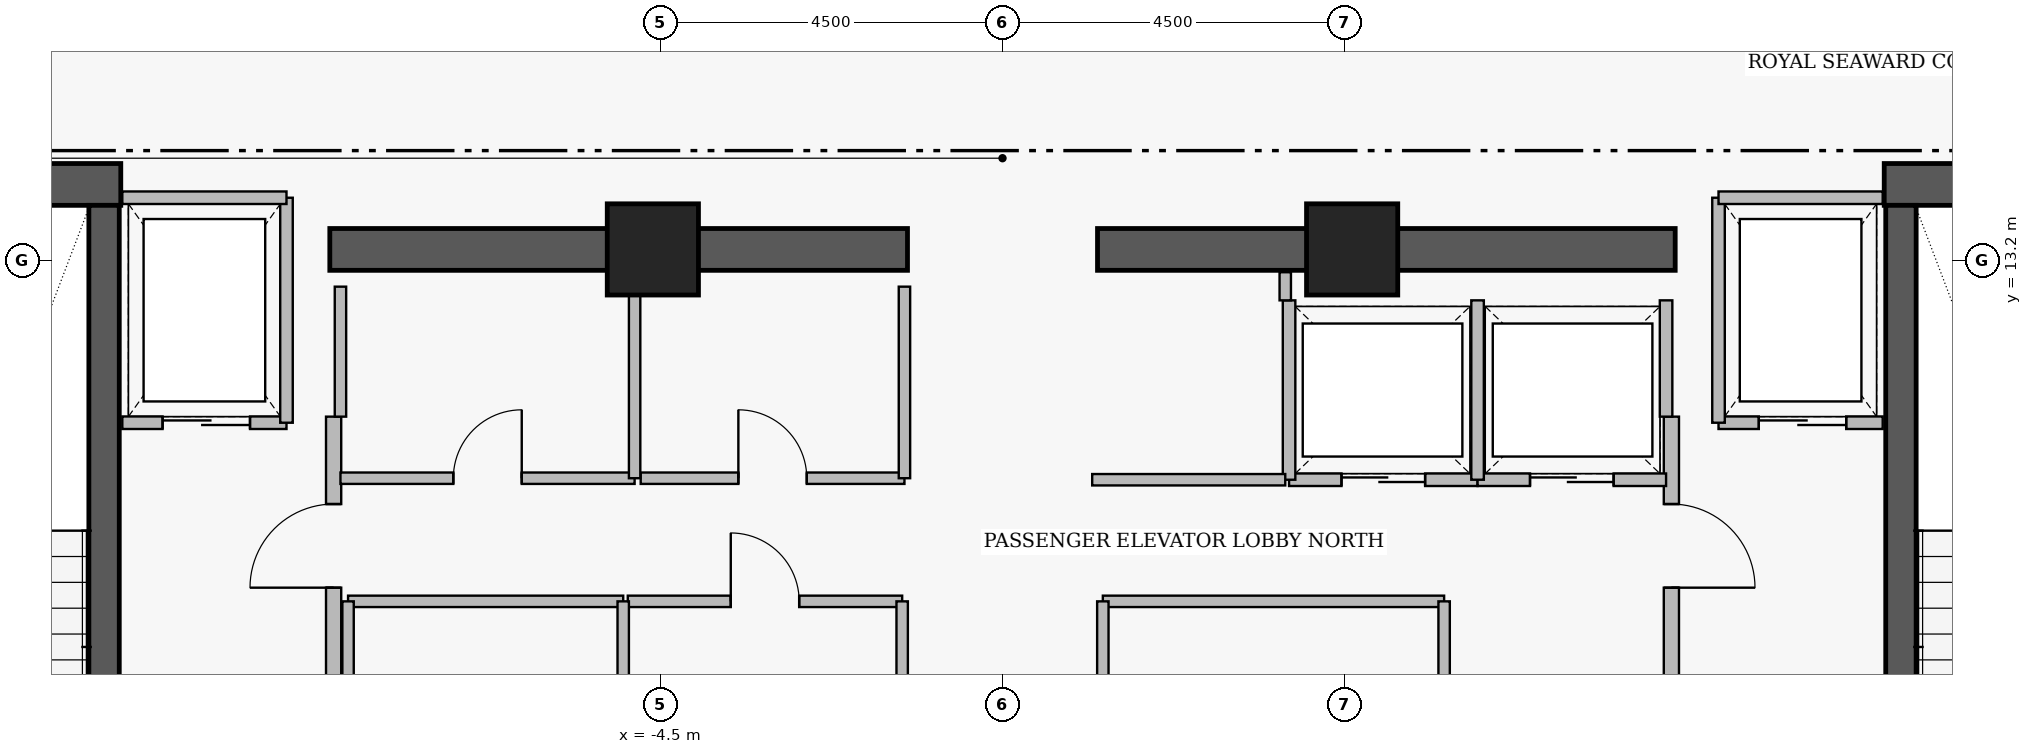
"""IFC4 building model, lengths in metres.
Left out: names, types, materials, properties, quantities, classifications, styles, units other than length and angle.
Written with IfcOpenShell. Run it as: python <this file> out.ifc"""

import sys

from ifc_helpers import new_model, si_unit, direction, frame, frame_2d, origin, origin_2d, place, context, subcontext, project, spatial, rectangle, extrude, element, fill, save


model = new_model("IFC4")
c1 = context("Model", 3, precision=1e-05, world=origin(), true_north=direction((0.0, 1.0)))
c2 = subcontext(c1, "Body", "Model", "MODEL_VIEW")
j1 = project(units=[si_unit("LENGTHUNIT", "METRE"), si_unit("PLANEANGLEUNIT", "RADIAN")], contexts=[c1])
p1 = place(None, origin())
s1 = spatial("IfcSite", under=j1, at=p1, CompositionType="ELEMENT")
p2 = place(p1, origin())
s2 = spatial("IfcBuilding", under=s1, at=p2, CompositionType="ELEMENT")
p3 = place(p2, frame((0.0, 0.0, 280.35)))
s3 = spatial("IfcBuildingStorey", under=s2, at=p3, CompositionType="ELEMENT", Elevation=280.35)
for number, where, z_axis, x_axis in (
    (1, (-15.96, 14.205, 0.0), (0.0, 0.0, 1.0), (1.0, 0.0, 0.0)),
    (2, (11.6, 14.205, 0.0), (0.0, 0.0, 1.0), (1.0, 0.0, 0.0)),
):
    element("IfcWall", number, at=place(p3, frame(where, z_axis=z_axis, x_axis=x_axis)), inside=s3, PredefinedType="SHEAR", context=c2, shape_type="SweptSolid", body=[
        extrude(rectangle(XDim=4.36, YDim=0.55, at=frame_2d((2.18, 0.0))), origin(), (0.0, 0.0, 1.0), 3.51),
    ])
for number, where, z_axis, x_axis in (
    (3, (-8.85, 13.35, 0.0), (0.0, 0.0, 1.0), (1.0, 0.0, 0.0)),
    (4, (1.25, 13.35, 0.0), (0.0, 0.0, 1.0), (1.0, 0.0, 0.0)),
):
    element("IfcWall", number, at=place(p3, frame(where, z_axis=z_axis, x_axis=x_axis)), inside=s3, PredefinedType="SHEAR", context=c2, shape_type="SweptSolid", body=[
        extrude(rectangle(XDim=7.6, YDim=0.55, at=frame_2d((3.8, 0.0))), origin(), (0.0, 0.0, 1.0), 3.48),
    ])
p4 = place(p3, frame((-11.82, 4.97, 0.0), z_axis=(0.0, 0.0, 1.0), x_axis=(0.0, 1.0, 0.0)))
e5 = element("IfcWall", 5, at=p4, inside=s3, PredefinedType="SHEAR", context=c2, shape_type="SweptSolid", body=[
    extrude(rectangle(XDim=8.96, YDim=0.4, at=frame_2d((4.48, 0.0))), origin(), (0.0, 0.0, 1.0), 3.51),
])
p5 = place(p4, frame((0.31, 0.0, 0.0)))
e6 = element("IfcOpeningElement", 6, at=p5, cuts=e5, PredefinedType="OPENING", context=c2, shape_type="SweptSolid", body=[
    extrude(rectangle(XDim=1.12, YDim=2.22, at=frame_2d((0.56, 1.11))), frame((0.0, 0.21, 0.0), z_axis=(0.0, -1.0, 0.0), x_axis=(1.0, 0.0, 0.0)), (0.0, 0.0, 1.0), 0.42),
])
p6 = place(p3, frame((11.82, 13.93, 0.0), z_axis=(0.0, 0.0, 1.0), x_axis=(0.0, -1.0, 0.0)))
e7 = element("IfcWall", 7, at=p6, inside=s3, PredefinedType="SHEAR", context=c2, shape_type="SweptSolid", body=[
    extrude(rectangle(XDim=8.96, YDim=0.4, at=frame_2d((4.48, 0.0))), origin(), (0.0, 0.0, 1.0), 3.51),
])
p7 = place(p6, frame((7.53, 0.0, 0.0)))
e8 = element("IfcOpeningElement", 8, at=p7, cuts=e7, PredefinedType="OPENING", context=c2, shape_type="SweptSolid", body=[
    extrude(rectangle(XDim=1.12, YDim=2.22, at=frame_2d((0.56, 1.11))), frame((0.0, 0.21, 0.0), z_axis=(0.0, -1.0, 0.0), x_axis=(1.0, 0.0, 0.0)), (0.0, 0.0, 1.0), 0.42),
])
for number, where, z_axis, x_axis in (
    (9, (-4.6, 13.35, 0.0), (0.0, 0.0, 1.0), (1.0, 0.0, 0.0)),
    (10, (4.6, 13.35, 0.0), (0.0, 0.0, 1.0), (1.0, 0.0, 0.0)),
):
    element("IfcColumn", number, at=place(p3, frame(where, z_axis=z_axis, x_axis=x_axis)), inside=s3, PredefinedType="COLUMN", context=c2, shape_type="SweptSolid", body=[
        extrude(rectangle(XDim=1.2, YDim=1.2, at=origin_2d()), origin(), (0.0, 0.0, 1.0), 3.7),
    ])
p8 = place(p3, frame((-8.8, 5.05, 0.0), z_axis=(0.0, 0.0, 1.0), x_axis=(0.0, 1.0, 0.0)))
e11 = element("IfcWall", 11, at=p8, inside=s3, PredefinedType="PARTITIONING", context=c2, shape_type="SweptSolid", body=[
    extrude(rectangle(XDim=6.1, YDim=0.2, at=frame_2d((3.05, 0.0))), origin(), (0.0, 0.0, 1.0), 3.48),
])
p9 = place(p8, frame((0.25, 0.0, 0.0)))
e12 = element("IfcOpeningElement", 12, at=p9, cuts=e11, PredefinedType="OPENING", context=c2, shape_type="SweptSolid", body=[
    extrude(rectangle(XDim=1.1, YDim=2.2, at=frame_2d((0.55, 1.1))), frame((0.0, 0.11, 0.0), z_axis=(0.0, -1.0, 0.0), x_axis=(1.0, 0.0, 0.0)), (0.0, 0.0, 1.0), 0.22),
])
p10 = place(p8, frame((3.85, 0.0, 0.0)))
e13 = element("IfcOpeningElement", 13, at=p10, cuts=e11, PredefinedType="OPENING", context=c2, shape_type="SweptSolid", body=[
    extrude(rectangle(XDim=1.1, YDim=2.2, at=frame_2d((0.55, 1.1))), frame((0.0, 0.11, 0.0), z_axis=(0.0, -1.0, 0.0), x_axis=(1.0, 0.0, 0.0)), (0.0, 0.0, 1.0), 0.22),
])
p11 = place(p3, frame((8.8, 11.15, 0.0), z_axis=(0.0, 0.0, 1.0), x_axis=(0.0, -1.0, 0.0)))
e14 = element("IfcWall", 14, at=p11, inside=s3, PredefinedType="PARTITIONING", context=c2, shape_type="SweptSolid", body=[
    extrude(rectangle(XDim=6.1, YDim=0.2, at=frame_2d((3.05, 0.0))), origin(), (0.0, 0.0, 1.0), 3.48),
])
p12 = place(p11, frame((1.15, 0.0, 0.0)))
e15 = element("IfcOpeningElement", 15, at=p12, cuts=e14, PredefinedType="OPENING", context=c2, shape_type="SweptSolid", body=[
    extrude(rectangle(XDim=1.1, YDim=2.2, at=frame_2d((0.55, 1.1))), frame((0.0, 0.11, 0.0), z_axis=(0.0, -1.0, 0.0), x_axis=(1.0, 0.0, 0.0)), (0.0, 0.0, 1.0), 0.22),
])
p13 = place(p11, frame((4.75, 0.0, 0.0)))
e16 = element("IfcOpeningElement", 16, at=p13, cuts=e14, PredefinedType="OPENING", context=c2, shape_type="SweptSolid", body=[
    extrude(rectangle(XDim=1.1, YDim=2.2, at=frame_2d((0.55, 1.1))), frame((0.0, 0.11, 0.0), z_axis=(0.0, -1.0, 0.0), x_axis=(1.0, 0.0, 0.0)), (0.0, 0.0, 1.0), 0.22),
])
p14 = place(p3, frame((-11.58, 11.07, 0.0), z_axis=(0.0, 0.0, 1.0), x_axis=(1.0, 0.0, 0.0)))
e17 = element("IfcWall", 17, at=p14, inside=s3, PredefinedType="PARTITIONING", context=c2, shape_type="SweptSolid", body=[
    extrude(rectangle(XDim=2.16, YDim=0.165, at=frame_2d((1.08, 0.0))), origin(), (0.0, 0.0, 1.0), 3.48),
])
p15 = place(p14, frame((0.53, 0.0, 0.0)))
e18 = element("IfcOpeningElement", 18, at=p15, cuts=e17, PredefinedType="OPENING", context=c2, shape_type="SweptSolid", body=[
    extrude(rectangle(XDim=1.15, YDim=2.25, at=frame_2d((0.575, 1.125))), frame((0.0, 0.093, 0.0), z_axis=(0.0, -1.0, 0.0), x_axis=(1.0, 0.0, 0.0)), (0.0, 0.0, 1.0), 0.185),
])
p16 = place(p3, frame((9.42, 11.07, 0.0), z_axis=(0.0, 0.0, 1.0), x_axis=(1.0, 0.0, 0.0)))
e19 = element("IfcWall", 19, at=p16, inside=s3, PredefinedType="PARTITIONING", context=c2, shape_type="SweptSolid", body=[
    extrude(rectangle(XDim=2.16, YDim=0.165, at=frame_2d((1.08, 0.0))), origin(), (0.0, 0.0, 1.0), 3.48),
])
p17 = place(p16, frame((0.53, 0.0, 0.0)))
e20 = element("IfcOpeningElement", 20, at=p17, cuts=e19, PredefinedType="OPENING", context=c2, shape_type="SweptSolid", body=[
    extrude(rectangle(XDim=1.15, YDim=2.25, at=frame_2d((0.575, 1.125))), frame((0.0, 0.093, 0.0), z_axis=(0.0, -1.0, 0.0), x_axis=(1.0, 0.0, 0.0)), (0.0, 0.0, 1.0), 0.185),
])
p18 = place(p3, frame((3.77, 10.32, 0.0), z_axis=(0.0, 0.0, 1.0), x_axis=(1.0, 0.0, 0.0)))
e21 = element("IfcWall", 21, at=p18, inside=s3, PredefinedType="PARTITIONING", context=c2, shape_type="SweptSolid", body=[
    extrude(rectangle(XDim=2.48, YDim=0.165, at=frame_2d((1.24, 0.0))), origin(), (0.0, 0.0, 1.0), 3.48),
])
p19 = place(p18, frame((0.69, 0.0, 0.0)))
e22 = element("IfcOpeningElement", 22, at=p19, cuts=e21, PredefinedType="OPENING", context=c2, shape_type="SweptSolid", body=[
    extrude(rectangle(XDim=1.1, YDim=2.25, at=frame_2d((0.55, 1.125))), frame((0.0, 0.093, 0.0), z_axis=(0.0, -1.0, 0.0), x_axis=(1.0, 0.0, 0.0)), (0.0, 0.0, 1.0), 0.185),
])
p20 = place(p3, frame((6.25, 10.32, 0.0), z_axis=(0.0, 0.0, 1.0), x_axis=(1.0, 0.0, 0.0)))
e23 = element("IfcWall", 23, at=p20, inside=s3, PredefinedType="PARTITIONING", context=c2, shape_type="SweptSolid", body=[
    extrude(rectangle(XDim=2.48, YDim=0.165, at=frame_2d((1.24, 0.0))), origin(), (0.0, 0.0, 1.0), 3.48),
])
p21 = place(p20, frame((0.69, 0.0, 0.0)))
e24 = element("IfcOpeningElement", 24, at=p21, cuts=e23, PredefinedType="OPENING", context=c2, shape_type="SweptSolid", body=[
    extrude(rectangle(XDim=1.1, YDim=2.25, at=frame_2d((0.55, 1.125))), frame((0.0, 0.093, 0.0), z_axis=(0.0, -1.0, 0.0), x_axis=(1.0, 0.0, 0.0)), (0.0, 0.0, 1.0), 0.185),
])
p22 = place(p3, frame((-8.71, 10.34, 0.0), z_axis=(0.0, 0.0, 1.0), x_axis=(1.0, 0.0, 0.0)))
e25 = element("IfcWall", 25, at=p22, inside=s3, PredefinedType="PARTITIONING", context=c2, shape_type="SweptSolid", body=[
    extrude(rectangle(XDim=3.87, YDim=0.15, at=frame_2d((1.935, 0.0))), origin(), (0.0, 0.0, 1.0), 3.48),
])
p23 = place(p22, frame((1.485, 0.0, 0.0)))
e26 = element("IfcOpeningElement", 26, at=p23, cuts=e25, PredefinedType="OPENING", context=c2, shape_type="SweptSolid", body=[
    extrude(rectangle(XDim=0.9, YDim=2.15, at=frame_2d((0.45, 1.075))), frame((0.0, 0.085, 0.0), z_axis=(0.0, -1.0, 0.0), x_axis=(1.0, 0.0, 0.0)), (0.0, 0.0, 1.0), 0.17),
])
p24 = place(p3, frame((-4.76, 10.34, 0.0), z_axis=(0.0, 0.0, 1.0), x_axis=(1.0, 0.0, 0.0)))
e27 = element("IfcWall", 27, at=p24, inside=s3, PredefinedType="PARTITIONING", context=c2, shape_type="SweptSolid", body=[
    extrude(rectangle(XDim=3.47, YDim=0.15, at=frame_2d((1.735, 0.0))), origin(), (0.0, 0.0, 1.0), 3.48),
])
p25 = place(p24, frame((1.285, 0.0, 0.0)))
e28 = element("IfcOpeningElement", 28, at=p25, cuts=e27, PredefinedType="OPENING", context=c2, shape_type="SweptSolid", body=[
    extrude(rectangle(XDim=0.9, YDim=2.15, at=frame_2d((0.45, 1.075))), frame((0.0, 0.085, 0.0), z_axis=(0.0, -1.0, 0.0), x_axis=(1.0, 0.0, 0.0)), (0.0, 0.0, 1.0), 0.17),
])
p26 = place(p3, frame((-4.93, 8.72, 0.0), z_axis=(0.0, 0.0, 1.0), x_axis=(1.0, 0.0, 0.0)))
e29 = element("IfcWall", 29, at=p26, inside=s3, PredefinedType="PARTITIONING", context=c2, shape_type="SweptSolid", body=[
    extrude(rectangle(XDim=3.61, YDim=0.15, at=frame_2d((1.805, 0.0))), origin(), (0.0, 0.0, 1.0), 3.48),
])
p27 = place(p26, frame((1.355, 0.0, 0.0)))
e30 = element("IfcOpeningElement", 30, at=p27, cuts=e29, PredefinedType="OPENING", context=c2, shape_type="SweptSolid", body=[
    extrude(rectangle(XDim=0.9, YDim=2.15, at=frame_2d((0.45, 1.075))), frame((0.0, 0.085, 0.0), z_axis=(0.0, -1.0, 0.0), x_axis=(1.0, 0.0, 0.0)), (0.0, 0.0, 1.0), 0.17),
])
p28 = place(p3, frame((-9.42, 11.07, 0.0), z_axis=(0.0, 0.0, 1.0), x_axis=(0.0, 1.0, 0.0)))
e31 = element("IfcWall", 31, at=p28, inside=s3, PredefinedType="PARTITIONING", context=c2, shape_type="SweptSolid", body=[
    extrude(rectangle(XDim=2.96, YDim=0.165, at=frame_2d((1.48, 0.0))), origin(), (0.0, 0.0, 1.0), 3.48),
])
p29 = place(p3, frame((-11.58, 14.03, 0.0), z_axis=(0.0, 0.0, 1.0), x_axis=(1.0, 0.0, 0.0)))
e32 = element("IfcWall", 32, at=p29, inside=s3, PredefinedType="PARTITIONING", context=c2, shape_type="SweptSolid", body=[
    extrude(rectangle(XDim=2.16, YDim=0.165, at=frame_2d((1.08, 0.0))), origin(), (0.0, 0.0, 1.0), 3.48),
])
p30 = place(p3, frame((9.42, 11.07, 0.0), z_axis=(0.0, 0.0, 1.0), x_axis=(0.0, 1.0, 0.0)))
e33 = element("IfcWall", 33, at=p30, inside=s3, PredefinedType="PARTITIONING", context=c2, shape_type="SweptSolid", body=[
    extrude(rectangle(XDim=2.96, YDim=0.165, at=frame_2d((1.48, 0.0))), origin(), (0.0, 0.0, 1.0), 3.48),
])
p31 = place(p3, frame((9.42, 14.03, 0.0), z_axis=(0.0, 0.0, 1.0), x_axis=(1.0, 0.0, 0.0)))
e34 = element("IfcWall", 34, at=p31, inside=s3, PredefinedType="PARTITIONING", context=c2, shape_type="SweptSolid", body=[
    extrude(rectangle(XDim=2.16, YDim=0.165, at=frame_2d((1.08, 0.0))), origin(), (0.0, 0.0, 1.0), 3.48),
])
for number, where, z_axis, x_axis in (
    (35, (3.77, 10.32, 0.0), (0.0, 0.0, 1.0), (0.0, 1.0, 0.0)),
    (36, (6.25, 10.32, 0.0), (0.0, 0.0, 1.0), (0.0, 1.0, 0.0)),
):
    element("IfcWall", number, at=place(p3, frame(where, z_axis=z_axis, x_axis=x_axis)), inside=s3, PredefinedType="PARTITIONING", context=c2, shape_type="SweptSolid", body=[
        extrude(rectangle(XDim=2.36, YDim=0.165, at=frame_2d((1.18, 0.0))), origin(), (0.0, 0.0, 1.0), 3.48),
    ])
p32 = place(p3, frame((8.73, 11.15, 0.0), z_axis=(0.0, 0.0, 1.0), x_axis=(0.0, 1.0, 0.0)))
e37 = element("IfcWall", 37, at=p32, inside=s3, PredefinedType="PARTITIONING", context=c2, shape_type="SweptSolid", body=[
    extrude(rectangle(XDim=1.53, YDim=0.165, at=frame_2d((0.765, 0.0))), origin(), (0.0, 0.0, 1.0), 3.48),
])
p33 = place(p3, frame((-8.71, 11.15, 0.0), z_axis=(0.0, 0.0, 1.0), x_axis=(0.0, 1.0, 0.0)))
e38 = element("IfcWall", 38, at=p33, inside=s3, PredefinedType="PARTITIONING", context=c2, shape_type="SweptSolid", body=[
    extrude(rectangle(XDim=1.71, YDim=0.15, at=frame_2d((0.855, 0.0))), origin(), (0.0, 0.0, 1.0), 3.48),
])
for number, where, z_axis, x_axis in (
    (39, (-4.84, 10.34, 0.0), (0.0, 0.0, 1.0), (0.0, 1.0, 0.0)),
    (40, (-1.29, 10.34, 0.0), (0.0, 0.0, 1.0), (0.0, 1.0, 0.0)),
):
    element("IfcWall", number, at=place(p3, frame(where, z_axis=z_axis, x_axis=x_axis)), inside=s3, PredefinedType="PARTITIONING", context=c2, shape_type="SweptSolid", body=[
        extrude(rectangle(XDim=2.52, YDim=0.15, at=frame_2d((1.26, 0.0))), origin(), (0.0, 0.0, 1.0), 3.48),
    ])
p34 = place(p3, frame((-8.61, 8.72, 0.0), z_axis=(0.0, 0.0, 1.0), x_axis=(1.0, 0.0, 0.0)))
e41 = element("IfcWall", 41, at=p34, inside=s3, PredefinedType="PARTITIONING", context=c2, shape_type="SweptSolid", body=[
    extrude(rectangle(XDim=3.62, YDim=0.15, at=frame_2d((1.81, 0.0))), origin(), (0.0, 0.0, 1.0), 3.48),
])
for number, where, z_axis, x_axis in (
    (42, (-8.61, 6.48, 0.0), (0.0, 0.0, 1.0), (0.0, 1.0, 0.0)),
    (43, (-4.99, 6.48, 0.0), (0.0, 0.0, 1.0), (0.0, 1.0, 0.0)),
    (44, (-1.32, 6.48, 0.0), (0.0, 0.0, 1.0), (0.0, 1.0, 0.0)),
):
    element("IfcWall", number, at=place(p3, frame(where, z_axis=z_axis, x_axis=x_axis)), inside=s3, PredefinedType="PARTITIONING", context=c2, shape_type="SweptSolid", body=[
        extrude(rectangle(XDim=2.24, YDim=0.15, at=frame_2d((1.12, 0.0))), origin(), (0.0, 0.0, 1.0), 3.48),
    ])
p35 = place(p3, frame((1.32, 8.72, 0.0), z_axis=(0.0, 0.0, 1.0), x_axis=(1.0, 0.0, 0.0)))
e45 = element("IfcWall", 45, at=p35, inside=s3, PredefinedType="PARTITIONING", context=c2, shape_type="SweptSolid", body=[
    extrude(rectangle(XDim=4.49, YDim=0.15, at=frame_2d((2.245, 0.0))), origin(), (0.0, 0.0, 1.0), 3.48),
])
for number, where, z_axis, x_axis in (
    (46, (1.32, 6.48, 0.0), (0.0, 0.0, 1.0), (0.0, 1.0, 0.0)),
    (47, (5.81, 6.48, 0.0), (0.0, 0.0, 1.0), (0.0, 1.0, 0.0)),
):
    element("IfcWall", number, at=place(p3, frame(where, z_axis=z_axis, x_axis=x_axis)), inside=s3, PredefinedType="PARTITIONING", context=c2, shape_type="SweptSolid", body=[
        extrude(rectangle(XDim=2.24, YDim=0.15, at=frame_2d((1.12, 0.0))), origin(), (0.0, 0.0, 1.0), 3.48),
    ])
p36 = place(p3, frame((1.18, 10.32, 0.0), z_axis=(0.0, 0.0, 1.0), x_axis=(1.0, 0.0, 0.0)))
e48 = element("IfcWall", 48, at=p36, inside=s3, PredefinedType="PARTITIONING", context=c2, shape_type="SweptSolid", body=[
    extrude(rectangle(XDim=2.54, YDim=0.15, at=frame_2d((1.27, 0.0))), origin(), (0.0, 0.0, 1.0), 3.48),
])
p37 = place(p3, frame((3.72, 12.68, 0.0), z_axis=(0.0, 0.0, 1.0), x_axis=(0.0, 1.0, 0.0)))
e49 = element("IfcWall", 49, at=p37, inside=s3, PredefinedType="PARTITIONING", context=c2, shape_type="SweptSolid", body=[
    extrude(rectangle(XDim=0.37, YDim=0.15, at=frame_2d((0.185, 0.0))), origin(), (0.0, 0.0, 1.0), 3.48),
])
p38 = place(p10, origin())
e50 = element("IfcDoor", 50, at=p38, inside=s3, OperationType="SINGLE_SWING_LEFT", PredefinedType="DOOR", context=c2, shape_type="SweptSolid", body=[
    extrude(rectangle(XDim=1.1, YDim=2.2, at=frame_2d((0.55, 1.1))), frame((0.0, 0.025, 0.0), z_axis=(0.0, -1.0, 0.0), x_axis=(1.0, 0.0, 0.0)), (0.0, 0.0, 1.0), 0.05),
])
fill(e13, e50)
p39 = place(p12, origin())
e51 = element("IfcDoor", 51, at=p39, inside=s3, OperationType="SINGLE_SWING_RIGHT", PredefinedType="DOOR", context=c2, shape_type="SweptSolid", body=[
    extrude(rectangle(XDim=1.1, YDim=2.2, at=frame_2d((0.55, 1.1))), frame((0.0, 0.025, 0.0), z_axis=(0.0, -1.0, 0.0), x_axis=(1.0, 0.0, 0.0)), (0.0, 0.0, 1.0), 0.05),
])
fill(e15, e51)
p40 = place(p15, origin())
e52 = element("IfcDoor", 52, at=p40, inside=s3, OperationType="SLIDING_TO_LEFT", PredefinedType="DOOR", context=c2, shape_type="SweptSolid", body=[
    extrude(rectangle(XDim=1.15, YDim=2.25, at=frame_2d((0.575, 1.125))), frame((0.0, 0.025, 0.0), z_axis=(0.0, -1.0, 0.0), x_axis=(1.0, 0.0, 0.0)), (0.0, 0.0, 1.0), 0.05),
])
fill(e18, e52)
p41 = place(p17, origin())
e53 = element("IfcDoor", 53, at=p41, inside=s3, OperationType="SLIDING_TO_LEFT", PredefinedType="DOOR", context=c2, shape_type="SweptSolid", body=[
    extrude(rectangle(XDim=1.15, YDim=2.25, at=frame_2d((0.575, 1.125))), frame((0.0, 0.025, 0.0), z_axis=(0.0, -1.0, 0.0), x_axis=(1.0, 0.0, 0.0)), (0.0, 0.0, 1.0), 0.05),
])
fill(e20, e53)
p42 = place(p19, origin())
e54 = element("IfcDoor", 54, at=p42, inside=s3, OperationType="SLIDING_TO_LEFT", PredefinedType="DOOR", context=c2, shape_type="SweptSolid", body=[
    extrude(rectangle(XDim=1.1, YDim=2.25, at=frame_2d((0.55, 1.125))), frame((0.0, 0.025, 0.0), z_axis=(0.0, -1.0, 0.0), x_axis=(1.0, 0.0, 0.0)), (0.0, 0.0, 1.0), 0.05),
])
fill(e22, e54)
p43 = place(p21, origin())
e55 = element("IfcDoor", 55, at=p43, inside=s3, OperationType="SLIDING_TO_LEFT", PredefinedType="DOOR", context=c2, shape_type="SweptSolid", body=[
    extrude(rectangle(XDim=1.1, YDim=2.25, at=frame_2d((0.55, 1.125))), frame((0.0, 0.025, 0.0), z_axis=(0.0, -1.0, 0.0), x_axis=(1.0, 0.0, 0.0)), (0.0, 0.0, 1.0), 0.05),
])
fill(e24, e55)
p44 = place(p23, origin())
e56 = element("IfcDoor", 56, at=p44, inside=s3, OperationType="SINGLE_SWING_RIGHT", PredefinedType="DOOR", context=c2, shape_type="SweptSolid", body=[
    extrude(rectangle(XDim=0.9, YDim=2.15, at=frame_2d((0.45, 1.075))), frame((0.0, 0.025, 0.0), z_axis=(0.0, -1.0, 0.0), x_axis=(1.0, 0.0, 0.0)), (0.0, 0.0, 1.0), 0.05),
])
fill(e26, e56)
p45 = place(p25, origin())
e57 = element("IfcDoor", 57, at=p45, inside=s3, OperationType="SINGLE_SWING_LEFT", PredefinedType="DOOR", context=c2, shape_type="SweptSolid", body=[
    extrude(rectangle(XDim=0.9, YDim=2.15, at=frame_2d((0.45, 1.075))), frame((0.0, 0.025, 0.0), z_axis=(0.0, -1.0, 0.0), x_axis=(1.0, 0.0, 0.0)), (0.0, 0.0, 1.0), 0.05),
])
fill(e28, e57)
p46 = place(p27, origin())
e58 = element("IfcDoor", 58, at=p46, inside=s3, OperationType="SINGLE_SWING_LEFT", PredefinedType="DOOR", context=c2, shape_type="SweptSolid", body=[
    extrude(rectangle(XDim=0.9, YDim=2.15, at=frame_2d((0.45, 1.075))), frame((0.0, 0.025, 0.0), z_axis=(0.0, -1.0, 0.0), x_axis=(1.0, 0.0, 0.0)), (0.0, 0.0, 1.0), 0.05),
])
fill(e30, e58)
save(model, sys.argv[1])
